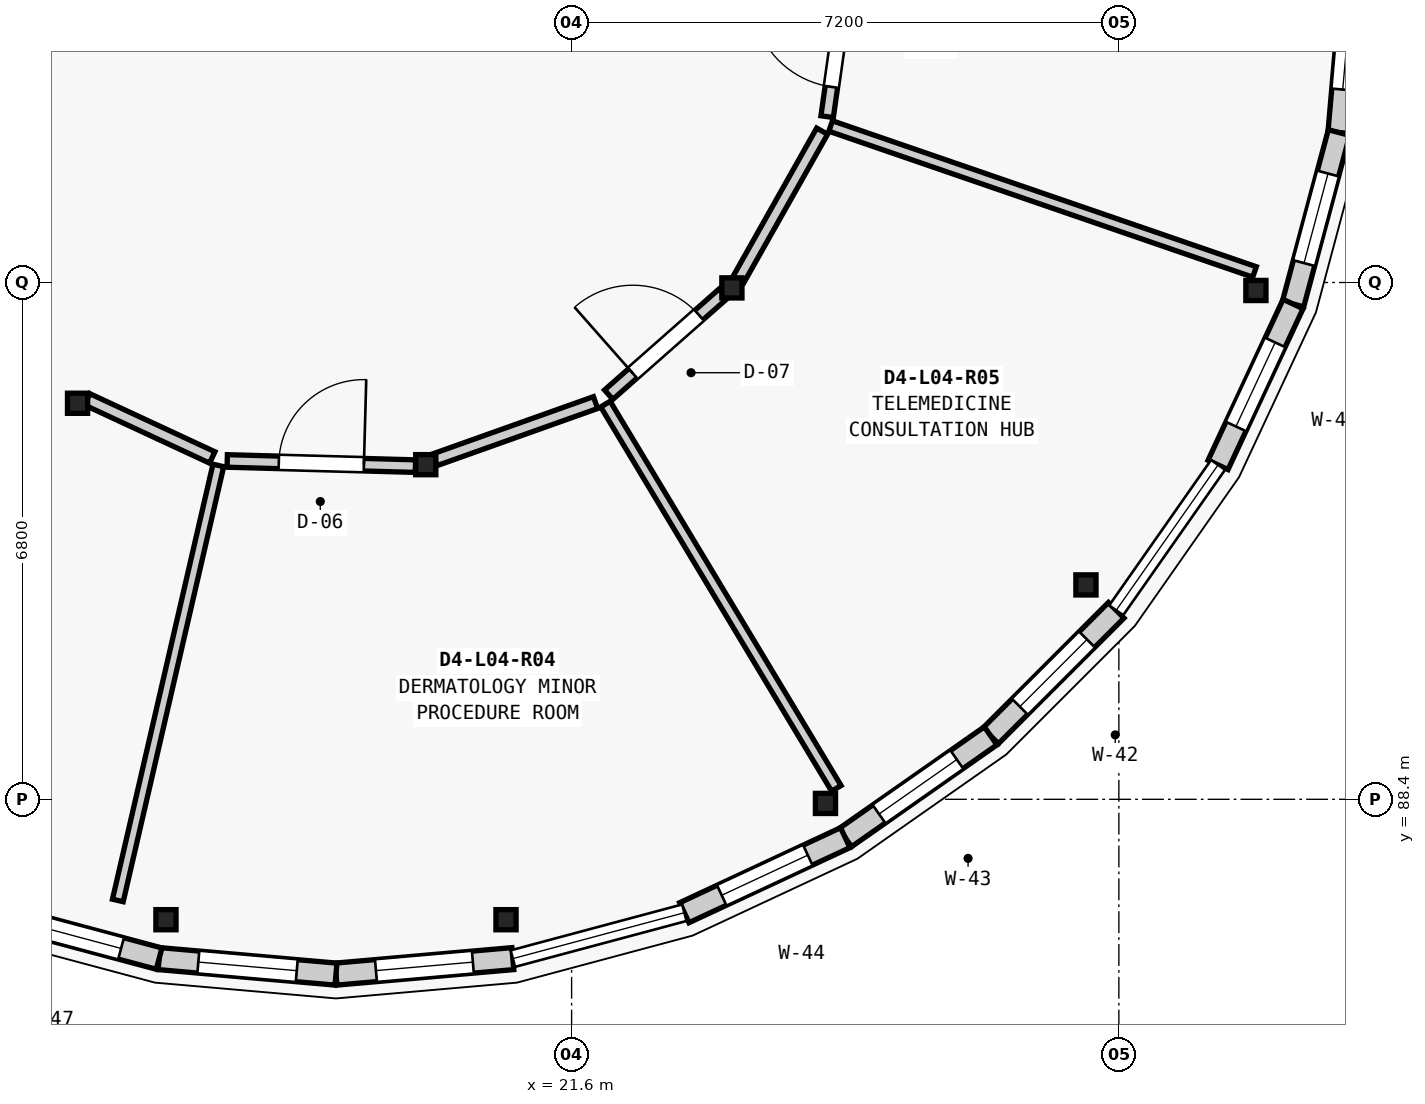
"""IFC4 building model, lengths in metres.
Left out: names, types, materials, properties, quantities, classifications, styles, units other than length and angle.
Written with IfcOpenShell. Run it as: python <this file> out.ifc"""

import sys

from ifc_helpers import new_model, si_unit, direction, frame, frame_2d, origin, origin_2d, place, context, subcontext, project, spatial, rectangle, extrude, element, fill, save


model = new_model("IFC4")
c1 = context("Model", 3, precision=1e-05, world=origin(), true_north=direction((0.0, 1.0)))
c2 = subcontext(c1, "Body", "Model", "MODEL_VIEW")
j1 = project(units=[si_unit("LENGTHUNIT", "METRE"), si_unit("PLANEANGLEUNIT", "RADIAN")], contexts=[c1])
p1 = place(None, origin())
s1 = spatial("IfcSite", under=j1, at=p1, CompositionType="ELEMENT")
p2 = place(p1, origin())
s2 = spatial("IfcBuilding", under=s1, at=p2, CompositionType="ELEMENT")
p3 = place(p2, frame((0.0, 0.0, 17.15)))
s3 = spatial("IfcBuildingStorey", under=s2, at=p3, CompositionType="ELEMENT", Elevation=17.15)
for number, where, z_axis, x_axis in (
    (1, (16.263, 86.816, 0.0), (0.0, 0.0, 1.0), (1.0, 0.0, 0.0)),
    (2, (20.737, 86.816, 0.0), (0.0, 0.0, 1.0), (1.0, 0.0, 0.0)),
    (3, (24.94, 88.346, 0.0), (0.0, 0.0, 1.0), (1.0, 0.0, 0.0)),
    (4, (28.367, 91.221, 0.0), (0.0, 0.0, 1.0), (1.0, 0.0, 0.0)),
    (5, (30.603, 95.095, 0.0), (0.0, 0.0, 1.0), (1.0, 0.0, 0.0)),
    (6, (15.1, 93.611, 0.0), (0.0, 0.0, 1.0), (1.0, 0.0, 0.0)),
    (7, (19.681, 92.803, 0.0), (0.0, 0.0, 1.0), (1.0, 0.0, 0.0)),
    (8, (23.709, 95.129, 0.0), (0.0, 0.0, 1.0), (1.0, 0.0, 0.0)),
):
    element("IfcColumn", number, at=place(p3, frame(where, z_axis=z_axis, x_axis=x_axis)), inside=s3, PredefinedType="COLUMN", context=c2, shape_type="SweptSolid", body=[
        extrude(rectangle(XDim=0.265, YDim=0.265, at=origin_2d()), origin(), (0.0, 0.0, 1.0), 4.2),
    ])
p4 = place(p3, frame((31.9, 99.5, 0.0), z_axis=(0.0, 0.0, 1.0), x_axis=(-0.087274565792, -0.996184295282, 0.0)))
e9 = element("IfcWall", 9, at=p4, inside=s3, PredefinedType="ELEMENTEDWALL", context=c2, shape_type="SweptSolid", body=[
    extrude(rectangle(XDim=2.336, YDim=0.29, at=frame_2d((1.168, 0.0))), origin(), (0.0, 0.0, 1.0), 3.369),
])
p5 = place(p4, frame((0.568, 0.0, 0.85)))
e10 = element("IfcOpeningElement", 10, at=p5, cuts=e9, PredefinedType="OPENING", context=c2, shape_type="SweptSolid", body=[
    extrude(rectangle(XDim=1.2, YDim=2.25, at=frame_2d((0.6, 1.125))), frame((0.0, 0.155, 0.0), z_axis=(0.0, -1.0, 0.0), x_axis=(1.0, 0.0, 0.0)), (0.0, 0.0, 1.0), 0.31),
])
p6 = place(p3, frame((31.696, 97.173, 0.0), z_axis=(0.0, 0.0, 1.0), x_axis=(-0.258612423585, -0.965981166673, 0.0)))
e11 = element("IfcWall", 11, at=p6, inside=s3, PredefinedType="ELEMENTEDWALL", context=c2, shape_type="SweptSolid", body=[
    extrude(rectangle(XDim=2.335, YDim=0.29, at=frame_2d((1.168, 0.0))), origin(), (0.0, 0.0, 1.0), 3.369),
])
p7 = place(p6, frame((0.558, 0.0, 0.85)))
e12 = element("IfcOpeningElement", 12, at=p7, cuts=e11, PredefinedType="OPENING", context=c2, shape_type="SweptSolid", body=[
    extrude(rectangle(XDim=1.22, YDim=1.5, at=frame_2d((0.61, 0.75))), frame((0.0, 0.155, 0.0), z_axis=(0.0, -1.0, 0.0), x_axis=(1.0, 0.0, 0.0)), (0.0, 0.0, 1.0), 0.31),
])
p8 = place(p3, frame((31.092, 94.917, 0.0), z_axis=(0.0, 0.0, 1.0), x_axis=(-0.422587894318, -0.906321946979, 0.0)))
e13 = element("IfcWall", 13, at=p8, inside=s3, PredefinedType="ELEMENTEDWALL", context=c2, shape_type="SweptSolid", body=[
    extrude(rectangle(XDim=2.336, YDim=0.29, at=frame_2d((1.168, 0.0))), origin(), (0.0, 0.0, 1.0), 3.369),
])
p9 = place(p8, frame((0.558, 0.0, 0.85)))
e14 = element("IfcOpeningElement", 14, at=p9, cuts=e13, PredefinedType="OPENING", context=c2, shape_type="SweptSolid", body=[
    extrude(rectangle(XDim=1.22, YDim=1.8, at=frame_2d((0.61, 0.9))), frame((0.0, 0.155, 0.0), z_axis=(0.0, -1.0, 0.0), x_axis=(1.0, 0.0, 0.0)), (0.0, 0.0, 1.0), 0.31),
])
p10 = place(p3, frame((28.765, 90.887, 0.0), z_axis=(0.0, 0.0, 1.0), x_axis=(-0.707106781187, -0.707106781187, 0.0)))
e15 = element("IfcWall", 15, at=p10, inside=s3, PredefinedType="ELEMENTEDWALL", context=c2, shape_type="SweptSolid", body=[
    extrude(rectangle(XDim=2.336, YDim=0.29, at=frame_2d((1.168, 0.0))), origin(), (0.0, 0.0, 1.0), 3.369),
])
p11 = place(p10, frame((0.543, 0.0, 0.85)))
e16 = element("IfcOpeningElement", 16, at=p11, cuts=e15, PredefinedType="OPENING", context=c2, shape_type="SweptSolid", body=[
    extrude(rectangle(XDim=1.25, YDim=1.5, at=frame_2d((0.625, 0.75))), frame((0.0, 0.155, 0.0), z_axis=(0.0, -1.0, 0.0), x_axis=(1.0, 0.0, 0.0)), (0.0, 0.0, 1.0), 0.31),
])
p12 = place(p3, frame((27.113, 89.235, 0.0), z_axis=(0.0, 0.0, 1.0), x_axis=(-0.819045278347, -0.573728883722, 0.0)))
e17 = element("IfcWall", 17, at=p12, inside=s3, PredefinedType="ELEMENTEDWALL", context=c2, shape_type="SweptSolid", body=[
    extrude(rectangle(XDim=2.336, YDim=0.29, at=frame_2d((1.168, 0.0))), origin(), (0.0, 0.0, 1.0), 3.369),
])
p13 = place(p12, frame((0.543, 0.0, 0.85)))
e18 = element("IfcOpeningElement", 18, at=p13, cuts=e17, PredefinedType="OPENING", context=c2, shape_type="SweptSolid", body=[
    extrude(rectangle(XDim=1.25, YDim=1.8, at=frame_2d((0.625, 0.9))), frame((0.0, 0.155, 0.0), z_axis=(0.0, -1.0, 0.0), x_axis=(1.0, 0.0, 0.0)), (0.0, 0.0, 1.0), 0.31),
])
p14 = place(p3, frame((25.2, 87.895, 0.0), z_axis=(0.0, 0.0, 1.0), x_axis=(-0.906321946979, -0.422587894318, 0.0)))
e19 = element("IfcWall", 19, at=p14, inside=s3, PredefinedType="ELEMENTEDWALL", context=c2, shape_type="SweptSolid", body=[
    extrude(rectangle(XDim=2.336, YDim=0.29, at=frame_2d((1.168, 0.0))), origin(), (0.0, 0.0, 1.0), 3.369),
])
p15 = place(p14, frame((0.543, 0.0, 0.85)))
e20 = element("IfcOpeningElement", 20, at=p15, cuts=e19, PredefinedType="OPENING", context=c2, shape_type="SweptSolid", body=[
    extrude(rectangle(XDim=1.25, YDim=2.1, at=frame_2d((0.625, 1.05))), frame((0.0, 0.155, 0.0), z_axis=(0.0, -1.0, 0.0), x_axis=(1.0, 0.0, 0.0)), (0.0, 0.0, 1.0), 0.31),
])
p16 = place(p3, frame((20.827, 86.304, 0.0), z_axis=(0.0, 0.0, 1.0), x_axis=(-0.996184295282, -0.087274565792, 0.0)))
e21 = element("IfcWall", 21, at=p16, inside=s3, PredefinedType="ELEMENTEDWALL", context=c2, shape_type="SweptSolid", body=[
    extrude(rectangle(XDim=2.336, YDim=0.29, at=frame_2d((1.168, 0.0))), origin(), (0.0, 0.0, 1.0), 3.369),
])
p17 = place(p16, frame((0.528, 0.0, 0.85)))
e22 = element("IfcOpeningElement", 22, at=p17, cuts=e21, PredefinedType="OPENING", context=c2, shape_type="SweptSolid", body=[
    extrude(rectangle(XDim=1.28, YDim=1.65, at=frame_2d((0.64, 0.825))), frame((0.0, 0.155, 0.0), z_axis=(0.0, -1.0, 0.0), x_axis=(1.0, 0.0, 0.0)), (0.0, 0.0, 1.0), 0.31),
])
p18 = place(p3, frame((18.5, 86.1, 0.0), z_axis=(0.0, 0.0, 1.0), x_axis=(-0.996184295282, 0.087274565792, 0.0)))
e23 = element("IfcWall", 23, at=p18, inside=s3, PredefinedType="ELEMENTEDWALL", context=c2, shape_type="SweptSolid", body=[
    extrude(rectangle(XDim=2.336, YDim=0.29, at=frame_2d((1.168, 0.0))), origin(), (0.0, 0.0, 1.0), 3.369),
])
p19 = place(p18, frame((0.518, 0.0, 0.85)))
e24 = element("IfcOpeningElement", 24, at=p19, cuts=e23, PredefinedType="OPENING", context=c2, shape_type="SweptSolid", body=[
    extrude(rectangle(XDim=1.3, YDim=1.4, at=frame_2d((0.65, 0.7))), frame((0.0, 0.155, 0.0), z_axis=(0.0, -1.0, 0.0), x_axis=(1.0, 0.0, 0.0)), (0.0, 0.0, 1.0), 0.31),
])
p20 = place(p3, frame((16.173, 86.304, 0.0), z_axis=(0.0, 0.0, 1.0), x_axis=(-0.965981166673, 0.258612423585, 0.0)))
e25 = element("IfcWall", 25, at=p20, inside=s3, PredefinedType="ELEMENTEDWALL", context=c2, shape_type="SweptSolid", body=[
    extrude(rectangle(XDim=2.335, YDim=0.29, at=frame_2d((1.168, 0.0))), origin(), (0.0, 0.0, 1.0), 3.369),
])
p21 = place(p20, frame((0.518, 0.0, 0.85)))
e26 = element("IfcOpeningElement", 26, at=p21, cuts=e25, PredefinedType="OPENING", context=c2, shape_type="SweptSolid", body=[
    extrude(rectangle(XDim=1.3, YDim=1.7, at=frame_2d((0.65, 0.85))), frame((0.0, 0.155, 0.0), z_axis=(0.0, -1.0, 0.0), x_axis=(1.0, 0.0, 0.0)), (0.0, 0.0, 1.0), 0.31),
])
p22 = place(p3, frame((16.952, 92.793, 0.0), z_axis=(0.0, 0.0, 1.0), x_axis=(-0.225041614944, -0.97434915279, 0.0)))
e27 = element("IfcWall", 27, at=p22, inside=s3, PredefinedType="PARTITIONING", context=c2, shape_type="SweptSolid", body=[
    extrude(rectangle(XDim=5.875, YDim=0.145, at=frame_2d((2.937, 0.0))), origin(), (0.0, 0.0, 1.0), 3.344),
])
p23 = place(p3, frame((22.045, 93.6, 0.0), z_axis=(0.0, 0.0, 1.0), x_axis=(0.515043444679, -0.857164074197, 0.0)))
e28 = element("IfcWall", 28, at=p23, inside=s3, PredefinedType="PARTITIONING", context=c2, shape_type="SweptSolid", body=[
    extrude(rectangle(XDim=5.899, YDim=0.145, at=frame_2d((2.949, 0.0))), origin(), (0.0, 0.0, 1.0), 3.344),
])
p24 = place(p3, frame((25.008, 97.259, 0.0), z_axis=(0.0, 0.0, 1.0), x_axis=(0.945537377012, -0.325513546068, 0.0)))
e29 = element("IfcWall", 29, at=p24, inside=s3, PredefinedType="PARTITIONING", context=c2, shape_type="SweptSolid", body=[
    extrude(rectangle(XDim=5.898, YDim=0.145, at=frame_2d((2.949, 0.0))), origin(), (0.0, 0.0, 1.0), 3.344),
])
p25 = place(p3, frame((15.228, 93.662, 0.0), z_axis=(0.0, 0.0, 1.0), x_axis=(0.906828861557, -0.421499010495, 0.0)))
e30 = element("IfcWall", 30, at=p25, inside=s3, PredefinedType="PARTITIONING", context=c2, shape_type="SweptSolid", body=[
    extrude(rectangle(XDim=1.813, YDim=0.165, at=frame_2d((0.906, 0.0))), origin(), (0.0, 0.0, 1.0), 3.344),
])
p26 = place(p3, frame((17.069, 92.852, 0.0), z_axis=(0.0, 0.0, 1.0), x_axis=(0.999621757445, -0.027501673437, 0.0)))
e31 = element("IfcWall", 31, at=p26, inside=s3, PredefinedType="PARTITIONING", context=c2, shape_type="SweptSolid", body=[
    extrude(rectangle(XDim=2.477, YDim=0.165, at=frame_2d((1.238, 0.0))), origin(), (0.0, 0.0, 1.0), 3.344),
])
p27 = place(p26, frame((0.679, 0.0, 0.0)))
e32 = element("IfcOpeningElement", 32, at=p27, cuts=e31, PredefinedType="OPENING", context=c2, shape_type="SweptSolid", body=[
    extrude(rectangle(XDim=1.12, YDim=2.16, at=frame_2d((0.56, 1.08))), frame((0.0, 0.093, 0.0), z_axis=(0.0, -1.0, 0.0), x_axis=(1.0, 0.0, 0.0)), (0.0, 0.0, 1.0), 0.185),
])
p28 = place(p3, frame((19.802, 92.868, 0.0), z_axis=(0.0, 0.0, 1.0), x_axis=(0.942088643155, 0.335363964132, 0.0)))
e33 = element("IfcWall", 33, at=p28, inside=s3, PredefinedType="PARTITIONING", context=c2, shape_type="SweptSolid", body=[
    extrude(rectangle(XDim=2.243, YDim=0.165, at=frame_2d((1.122, 0.0))), origin(), (0.0, 0.0, 1.0), 3.344),
])
p29 = place(p3, frame((22.088, 93.724, 0.0), z_axis=(0.0, 0.0, 1.0), x_axis=(0.750064751016, 0.66136439977, 0.0)))
e34 = element("IfcWall", 34, at=p29, inside=s3, PredefinedType="PARTITIONING", context=c2, shape_type="SweptSolid", body=[
    extrude(rectangle(XDim=2.009, YDim=0.165, at=frame_2d((1.005, 0.0))), origin(), (0.0, 0.0, 1.0), 3.344),
])
p30 = place(p29, frame((0.424, 0.0, 0.0)))
e35 = element("IfcOpeningElement", 35, at=p30, cuts=e34, PredefinedType="OPENING", context=c2, shape_type="SweptSolid", body=[
    extrude(rectangle(XDim=1.16, YDim=2.18, at=frame_2d((0.58, 1.09))), frame((0.0, 0.093, 0.0), z_axis=(0.0, -1.0, 0.0), x_axis=(1.0, 0.0, 0.0)), (0.0, 0.0, 1.0), 0.185),
])
p31 = place(p3, frame((23.794, 95.237, 0.0), z_axis=(0.0, 0.0, 1.0), x_axis=(0.491278846753, 0.87100235059, 0.0)))
e36 = element("IfcWall", 36, at=p31, inside=s3, PredefinedType="PARTITIONING", context=c2, shape_type="SweptSolid", body=[
    extrude(rectangle(XDim=2.243, YDim=0.165, at=frame_2d((1.122, 0.0))), origin(), (0.0, 0.0, 1.0), 3.344),
])
p32 = place(p3, frame((24.962, 97.382, 0.0), z_axis=(0.0, 0.0, 1.0), x_axis=(0.140164013462, 0.990128299429, 0.0)))
e37 = element("IfcWall", 37, at=p32, inside=s3, PredefinedType="PARTITIONING", context=c2, shape_type="SweptSolid", body=[
    extrude(rectangle(XDim=2.012, YDim=0.165, at=frame_2d((1.006, 0.0))), origin(), (0.0, 0.0, 1.0), 3.344),
])
p33 = place(p32, frame((0.396, 0.0, 0.0)))
e38 = element("IfcOpeningElement", 38, at=p33, cuts=e37, PredefinedType="OPENING", context=c2, shape_type="SweptSolid", body=[
    extrude(rectangle(XDim=1.22, YDim=2.18, at=frame_2d((0.61, 1.09))), frame((0.0, 0.093, 0.0), z_axis=(0.0, -1.0, 0.0), x_axis=(1.0, 0.0, 0.0)), (0.0, 0.0, 1.0), 0.185),
])
p34 = place(p5, origin())
e39 = element("IfcWindow", 39, at=p34, inside=s3, PartitioningType="SINGLE_PANEL", PredefinedType="WINDOW", context=c2, shape_type="SweptSolid", body=[
    extrude(rectangle(XDim=1.2, YDim=2.25, at=frame_2d((0.6, 1.125))), frame((0.0, 0.03, 0.0), z_axis=(0.0, -1.0, 0.0), x_axis=(1.0, 0.0, 0.0)), (0.0, 0.0, 1.0), 0.06),
])
fill(e10, e39)
p35 = place(p7, origin())
e40 = element("IfcWindow", 40, at=p35, inside=s3, PartitioningType="SINGLE_PANEL", PredefinedType="WINDOW", context=c2, shape_type="SweptSolid", body=[
    extrude(rectangle(XDim=1.22, YDim=1.5, at=frame_2d((0.61, 0.75))), frame((0.0, 0.03, 0.0), z_axis=(0.0, -1.0, 0.0), x_axis=(1.0, 0.0, 0.0)), (0.0, 0.0, 1.0), 0.06),
])
fill(e12, e40)
p36 = place(p9, origin())
e41 = element("IfcWindow", 41, at=p36, inside=s3, PartitioningType="SINGLE_PANEL", PredefinedType="WINDOW", context=c2, shape_type="SweptSolid", body=[
    extrude(rectangle(XDim=1.22, YDim=1.8, at=frame_2d((0.61, 0.9))), frame((0.0, 0.03, 0.0), z_axis=(0.0, -1.0, 0.0), x_axis=(1.0, 0.0, 0.0)), (0.0, 0.0, 1.0), 0.06),
])
fill(e14, e41)
p37 = place(p11, origin())
e42 = element("IfcWindow", 42, at=p37, inside=s3, PartitioningType="SINGLE_PANEL", PredefinedType="WINDOW", context=c2, shape_type="SweptSolid", body=[
    extrude(rectangle(XDim=1.25, YDim=1.5, at=frame_2d((0.625, 0.75))), frame((0.0, 0.03, 0.0), z_axis=(0.0, -1.0, 0.0), x_axis=(1.0, 0.0, 0.0)), (0.0, 0.0, 1.0), 0.06),
])
fill(e16, e42)
p38 = place(p13, origin())
e43 = element("IfcWindow", 43, at=p38, inside=s3, PartitioningType="SINGLE_PANEL", PredefinedType="WINDOW", context=c2, shape_type="SweptSolid", body=[
    extrude(rectangle(XDim=1.25, YDim=1.8, at=frame_2d((0.625, 0.9))), frame((0.0, 0.03, 0.0), z_axis=(0.0, -1.0, 0.0), x_axis=(1.0, 0.0, 0.0)), (0.0, 0.0, 1.0), 0.06),
])
fill(e18, e43)
p39 = place(p15, origin())
e44 = element("IfcWindow", 44, at=p39, inside=s3, PartitioningType="SINGLE_PANEL", PredefinedType="WINDOW", context=c2, shape_type="SweptSolid", body=[
    extrude(rectangle(XDim=1.25, YDim=2.1, at=frame_2d((0.625, 1.05))), frame((0.0, 0.03, 0.0), z_axis=(0.0, -1.0, 0.0), x_axis=(1.0, 0.0, 0.0)), (0.0, 0.0, 1.0), 0.06),
])
fill(e20, e44)
p40 = place(p17, origin())
e45 = element("IfcWindow", 45, at=p40, inside=s3, PartitioningType="SINGLE_PANEL", PredefinedType="WINDOW", context=c2, shape_type="SweptSolid", body=[
    extrude(rectangle(XDim=1.28, YDim=1.65, at=frame_2d((0.64, 0.825))), frame((0.0, 0.03, 0.0), z_axis=(0.0, -1.0, 0.0), x_axis=(1.0, 0.0, 0.0)), (0.0, 0.0, 1.0), 0.06),
])
fill(e22, e45)
p41 = place(p19, origin())
e46 = element("IfcWindow", 46, at=p41, inside=s3, PartitioningType="SINGLE_PANEL", PredefinedType="WINDOW", context=c2, shape_type="SweptSolid", body=[
    extrude(rectangle(XDim=1.3, YDim=1.4, at=frame_2d((0.65, 0.7))), frame((0.0, 0.03, 0.0), z_axis=(0.0, -1.0, 0.0), x_axis=(1.0, 0.0, 0.0)), (0.0, 0.0, 1.0), 0.06),
])
fill(e24, e46)
p42 = place(p21, origin())
e47 = element("IfcWindow", 47, at=p42, inside=s3, PartitioningType="SINGLE_PANEL", PredefinedType="WINDOW", context=c2, shape_type="SweptSolid", body=[
    extrude(rectangle(XDim=1.3, YDim=1.7, at=frame_2d((0.65, 0.85))), frame((0.0, 0.03, 0.0), z_axis=(0.0, -1.0, 0.0), x_axis=(1.0, 0.0, 0.0)), (0.0, 0.0, 1.0), 0.06),
])
fill(e26, e47)
p43 = place(p27, origin())
e48 = element("IfcDoor", 48, at=p43, inside=s3, OperationType="SINGLE_SWING_RIGHT", PredefinedType="DOOR", context=c2, shape_type="SweptSolid", body=[
    extrude(rectangle(XDim=1.12, YDim=2.16, at=frame_2d((0.56, 1.08))), frame((0.0, 0.025, 0.0), z_axis=(0.0, -1.0, 0.0), x_axis=(1.0, 0.0, 0.0)), (0.0, 0.0, 1.0), 0.05),
])
fill(e32, e48)
p44 = place(p30, origin())
e49 = element("IfcDoor", 49, at=p44, inside=s3, OperationType="SINGLE_SWING_LEFT", PredefinedType="DOOR", context=c2, shape_type="SweptSolid", body=[
    extrude(rectangle(XDim=1.16, YDim=2.18, at=frame_2d((0.58, 1.09))), frame((0.0, 0.025, 0.0), z_axis=(0.0, -1.0, 0.0), x_axis=(1.0, 0.0, 0.0)), (0.0, 0.0, 1.0), 0.05),
])
fill(e35, e49)
p45 = place(p33, origin())
e50 = element("IfcDoor", 50, at=p45, inside=s3, OperationType="SINGLE_SWING_RIGHT", PredefinedType="DOOR", context=c2, shape_type="SweptSolid", body=[
    extrude(rectangle(XDim=1.22, YDim=2.18, at=frame_2d((0.61, 1.09))), frame((0.0, 0.025, 0.0), z_axis=(0.0, -1.0, 0.0), x_axis=(1.0, 0.0, 0.0)), (0.0, 0.0, 1.0), 0.05),
])
fill(e38, e50)
save(model, sys.argv[1])
